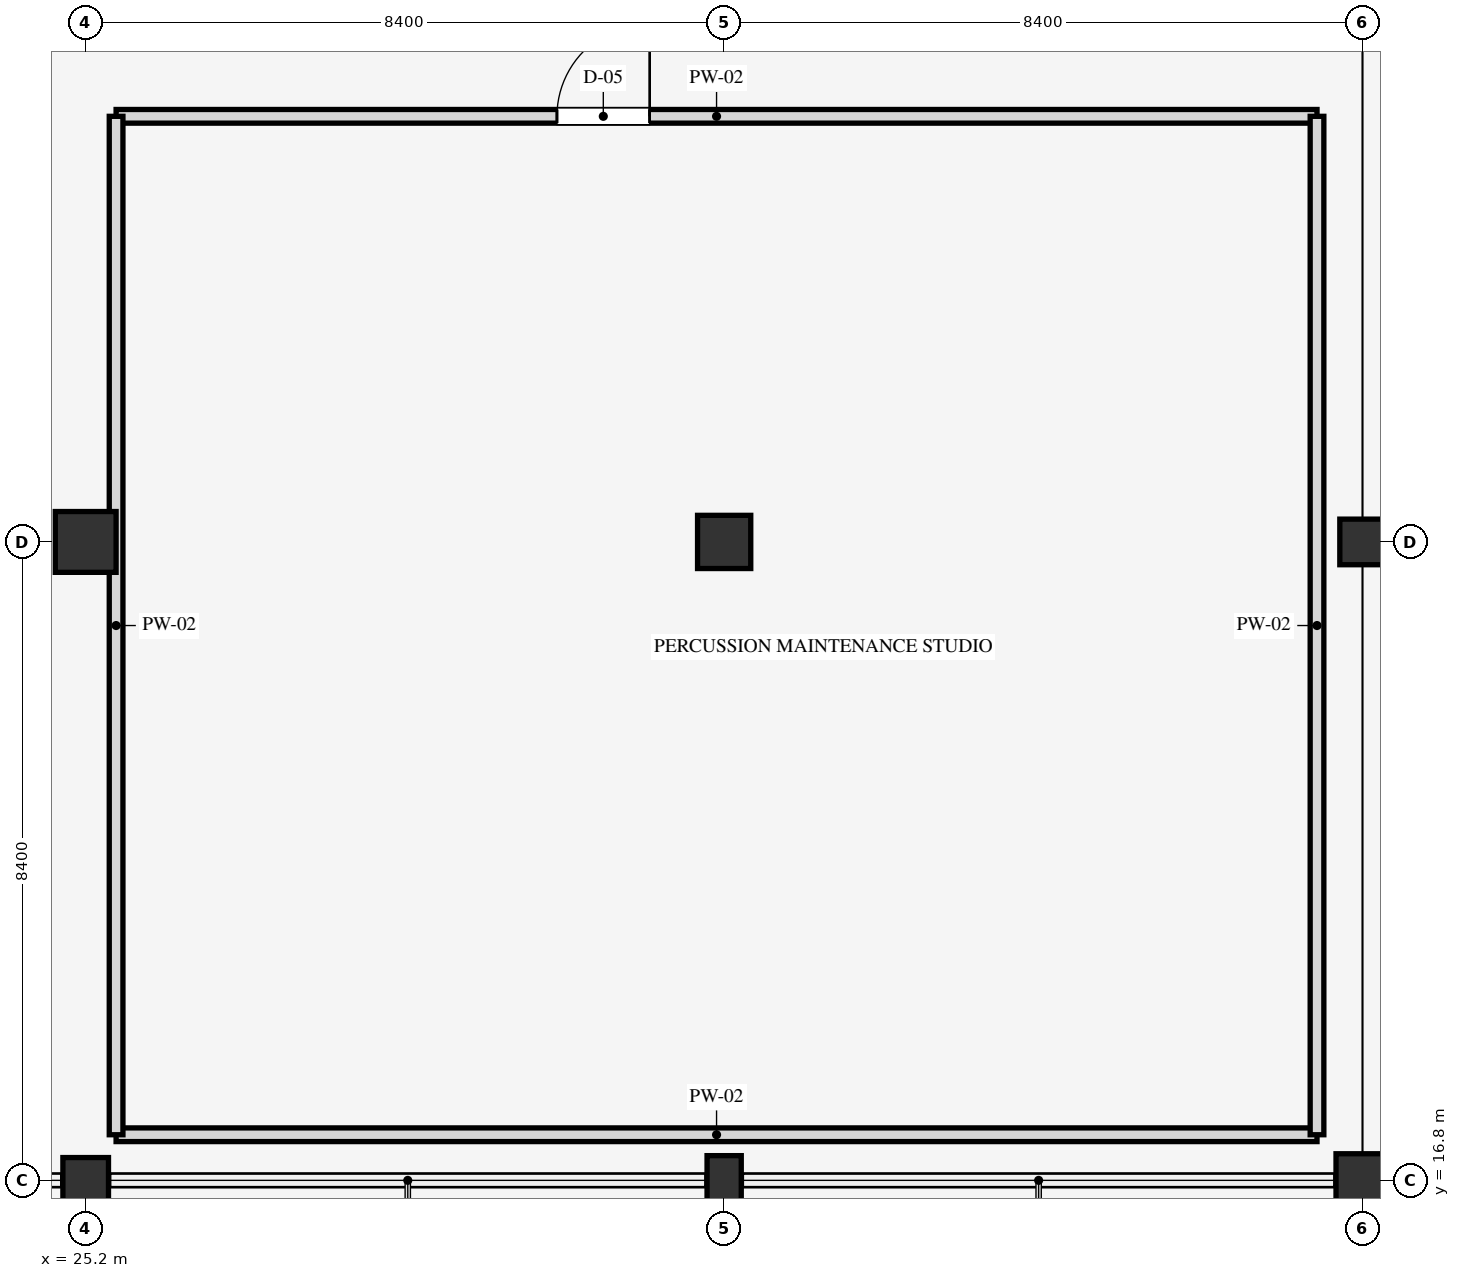
"""IFC4 building model, lengths in metres.
Left out: names, types, materials, properties, quantities, classifications, styles, units other than length and angle.
Written with IfcOpenShell. Run it as: python <this file> out.ifc"""

import sys

from ifc_helpers import new_model, si_unit, direction, frame, frame_2d, origin, origin_2d, place, context, subcontext, project, spatial, rectangle, extrude, element, fill, save


model = new_model("IFC4")
c1 = context("Model", 3, precision=1e-05, world=origin(), true_north=direction((0.0, 1.0)))
c2 = subcontext(c1, "Body", "Model", "MODEL_VIEW")
j1 = project(units=[si_unit("LENGTHUNIT", "METRE"), si_unit("PLANEANGLEUNIT", "RADIAN")], contexts=[c1])
p1 = place(None, origin())
s1 = spatial("IfcSite", under=j1, at=p1, CompositionType="ELEMENT")
p2 = place(p1, origin())
s2 = spatial("IfcBuilding", under=s1, at=p2, CompositionType="ELEMENT")
p3 = place(p2, frame((0.0, 0.0, 9.9)))
s3 = spatial("IfcBuildingStorey", under=s2, at=p3, CompositionType="ELEMENT", Elevation=9.9)
p4 = place(p3, frame((25.2, 16.8, 0.0), z_axis=(0.0, 0.0, 1.0), x_axis=(1.0, 0.0, 0.0)))
e1 = element("IfcColumn", 1, at=p4, inside=s3, PredefinedType="COLUMN", context=c2, shape_type="SweptSolid", body=[
    extrude(rectangle(XDim=0.6, YDim=0.6, at=origin_2d()), origin(), (0.0, 0.0, 1.0), 4.5),
])
p5 = place(p3, frame((25.2, 25.2, 0.0), z_axis=(0.0, 0.0, 1.0), x_axis=(1.0, 0.0, 0.0)))
e2 = element("IfcColumn", 2, at=p5, inside=s3, PredefinedType="COLUMN", context=c2, shape_type="SweptSolid", body=[
    extrude(rectangle(XDim=0.8, YDim=0.8, at=origin_2d()), origin(), (0.0, 0.0, 1.0), 4.5),
])
p6 = place(p3, frame((33.6, 16.8, 0.0), z_axis=(0.0, 0.0, 1.0), x_axis=(1.0, 0.0, 0.0)))
e3 = element("IfcColumn", 3, at=p6, inside=s3, PredefinedType="PILASTER", context=c2, shape_type="SweptSolid", body=[
    extrude(rectangle(XDim=0.45, YDim=0.65, at=origin_2d()), origin(), (0.0, 0.0, 1.0), 4.5),
])
for number, where, z_axis, x_axis in (
    (4, (33.6, 25.2, 0.0), (0.0, 0.0, 1.0), (1.0, 0.0, 0.0)),
    (5, (42.0, 16.8, 0.0), (0.0, 0.0, 1.0), (1.0, 0.0, 0.0)),
):
    element("IfcColumn", number, at=place(p3, frame(where, z_axis=z_axis, x_axis=x_axis)), inside=s3, PredefinedType="COLUMN", context=c2, shape_type="SweptSolid", body=[
        extrude(rectangle(XDim=0.7, YDim=0.7, at=origin_2d()), origin(), (0.0, 0.0, 1.0), 4.5),
    ])
p7 = place(p3, frame((42.0, 25.2, 0.0), z_axis=(0.0, 0.0, 1.0), x_axis=(1.0, 0.0, 0.0)))
e6 = element("IfcColumn", 6, at=p7, inside=s3, PredefinedType="COLUMN", context=c2, shape_type="SweptSolid", body=[
    extrude(rectangle(XDim=0.6, YDim=0.6, at=origin_2d()), origin(), (0.0, 0.0, 1.0), 4.5),
])
p8 = place(p3, frame((25.6, 17.4, 0.0), z_axis=(0.0, 0.0, 1.0), x_axis=(1.0, 0.0, 0.0)))
e7 = element("IfcWall", 7, at=p8, inside=s3, PredefinedType="PARTITIONING", context=c2, shape_type="SweptSolid", body=[
    extrude(rectangle(XDim=15.8, YDim=0.18, at=frame_2d((7.9, 0.0))), origin(), (0.0, 0.0, 1.0), 3.54),
])
p9 = place(p3, frame((25.6, 30.8, 0.0), z_axis=(0.0, 0.0, 1.0), x_axis=(1.0, 0.0, 0.0)))
e8 = element("IfcWall", 8, at=p9, inside=s3, PredefinedType="PARTITIONING", context=c2, shape_type="SweptSolid", body=[
    extrude(rectangle(XDim=15.8, YDim=0.18, at=frame_2d((7.9, 0.0))), origin(), (0.0, 0.0, 1.0), 3.54),
])
p10 = place(p9, frame((5.8, 0.0, 0.0)))
e9 = element("IfcOpeningElement", 9, at=p10, cuts=e8, PredefinedType="OPENING", context=c2, shape_type="SweptSolid", body=[
    extrude(rectangle(XDim=1.22, YDim=2.15, at=frame_2d((0.61, 1.075))), frame((0.0, 0.1, 0.0), z_axis=(0.0, -1.0, 0.0), x_axis=(1.0, 0.0, 0.0)), (0.0, 0.0, 1.0), 0.2),
])
for number, where, z_axis, x_axis in (
    (10, (25.6, 17.4, 0.0), (0.0, 0.0, 1.0), (0.0, 1.0, 0.0)),
    (11, (41.4, 17.4, 0.0), (0.0, 0.0, 1.0), (0.0, 1.0, 0.0)),
):
    element("IfcWall", number, at=place(p3, frame(where, z_axis=z_axis, x_axis=x_axis)), inside=s3, PredefinedType="PARTITIONING", context=c2, shape_type="SweptSolid", body=[
        extrude(rectangle(XDim=13.4, YDim=0.18, at=frame_2d((6.7, 0.0))), origin(), (0.0, 0.0, 1.0), 3.54),
    ])
p11 = place(p10, origin())
e12 = element("IfcDoor", 12, at=p11, inside=s3, OperationType="SINGLE_SWING_RIGHT", PredefinedType="DOOR", context=c2, shape_type="SweptSolid", body=[
    extrude(rectangle(XDim=1.22, YDim=2.15, at=frame_2d((0.61, 1.075))), frame((0.0, 0.025, 0.0), z_axis=(0.0, -1.0, 0.0), x_axis=(1.0, 0.0, 0.0)), (0.0, 0.0, 1.0), 0.05),
])
fill(e9, e12)
save(model, sys.argv[1])
